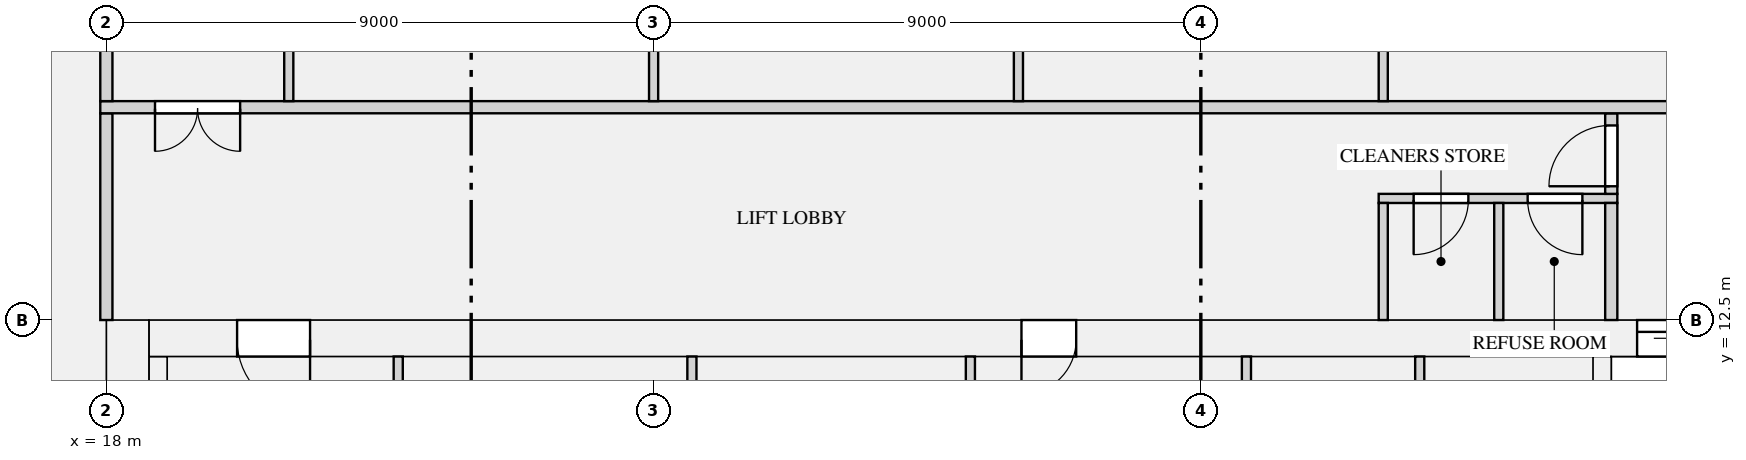
"""IFC4 building model, lengths in metres.
Left out: names, types, materials, properties, quantities, classifications, styles, units other than length and angle.
Written with IfcOpenShell. Run it as: python <this file> out.ifc"""

import sys

from ifc_helpers import new_model, si_unit, direction, frame, frame_2d, origin, place, context, subcontext, project, spatial, rectangle, extrude, element, fill, save


model = new_model("IFC4")
c1 = context("Model", 3, precision=1e-05, world=origin(), true_north=direction((0.0, 1.0)))
c2 = subcontext(c1, "Body", "Model", "MODEL_VIEW")
j1 = project(units=[si_unit("LENGTHUNIT", "METRE"), si_unit("PLANEANGLEUNIT", "RADIAN")], contexts=[c1])
p1 = place(None, origin())
s1 = spatial("IfcSite", under=j1, at=p1, CompositionType="ELEMENT")
p2 = place(p1, origin())
s2 = spatial("IfcBuilding", under=s1, at=p2, CompositionType="ELEMENT")
p3 = place(p2, frame((0.0, 0.0, 144.45)))
s3 = spatial("IfcBuildingStorey", under=s2, at=p3, CompositionType="ELEMENT", Elevation=144.45)
p4 = place(p3, frame((18.35, 0.0, 0.0), z_axis=(0.0, 0.0, 1.0), x_axis=(0.0, 1.0, 0.0)))
e1 = element("IfcWall", 1, at=p4, inside=s3, PredefinedType="SHEAR", context=c2, shape_type="SweptSolid", body=[
    extrude(rectangle(XDim=12.5, YDim=0.7, at=frame_2d((6.25, 0.0))), origin(), (0.0, 0.0, 1.0), 3.15),
])
p5 = place(p3, frame((18.7, 12.2, 0.0), z_axis=(0.0, 0.0, 1.0), x_axis=(1.0, 0.0, 0.0)))
e2 = element("IfcWall", 2, at=p5, inside=s3, PredefinedType="SHEAR", context=c2, shape_type="SweptSolid", body=[
    extrude(rectangle(XDim=34.6, YDim=0.6, at=frame_2d((17.3, 0.0))), origin(), (0.0, 0.0, 1.0), 3.15),
])
p6 = place(p5, frame((24.475, 0.0, 0.0)))
e3 = element("IfcOpeningElement", 3, at=p6, cuts=e2, PredefinedType="OPENING", context=c2, shape_type="SweptSolid", body=[
    extrude(rectangle(XDim=1.1, YDim=2.1, at=frame_2d((0.55, 1.05))), frame((0.0, 0.31, 0.0), z_axis=(0.0, -1.0, 0.0), x_axis=(1.0, 0.0, 0.0)), (0.0, 0.0, 1.0), 0.62),
])
p7 = place(p5, frame((26.725, 0.0, 0.0)))
e4 = element("IfcOpeningElement", 4, at=p7, cuts=e2, PredefinedType="OPENING", context=c2, shape_type="SweptSolid", body=[
    extrude(rectangle(XDim=1.1, YDim=2.1, at=frame_2d((0.55, 1.05))), frame((0.0, 0.31, 0.0), z_axis=(0.0, -1.0, 0.0), x_axis=(1.0, 0.0, 0.0)), (0.0, 0.0, 1.0), 0.62),
])
p8 = place(p5, frame((28.975, 0.0, 0.0)))
e5 = element("IfcOpeningElement", 5, at=p8, cuts=e2, PredefinedType="OPENING", context=c2, shape_type="SweptSolid", body=[
    extrude(rectangle(XDim=1.1, YDim=2.1, at=frame_2d((0.55, 1.05))), frame((0.0, 0.31, 0.0), z_axis=(0.0, -1.0, 0.0), x_axis=(1.0, 0.0, 0.0)), (0.0, 0.0, 1.0), 0.62),
])
p9 = place(p5, frame((14.35, 0.0, 0.0)))
e6 = element("IfcOpeningElement", 6, at=p9, cuts=e2, PredefinedType="OPENING", context=c2, shape_type="SweptSolid", body=[
    extrude(rectangle(XDim=0.9, YDim=2.1, at=frame_2d((0.45, 1.05))), frame((0.0, 0.31, 0.0), z_axis=(0.0, -1.0, 0.0), x_axis=(1.0, 0.0, 0.0)), (0.0, 0.0, 1.0), 0.62),
])
p10 = place(p5, frame((1.45, 0.0, 0.0)))
e7 = element("IfcOpeningElement", 7, at=p10, cuts=e2, PredefinedType="OPENING", context=c2, shape_type="SweptSolid", body=[
    extrude(rectangle(XDim=1.2, YDim=2.1, at=frame_2d((0.6, 1.05))), frame((0.0, 0.31, 0.0), z_axis=(0.0, -1.0, 0.0), x_axis=(1.0, 0.0, 0.0)), (0.0, 0.0, 1.0), 0.62),
])
p11 = place(p5, frame((31.95, 0.0, 0.0)))
e8 = element("IfcOpeningElement", 8, at=p11, cuts=e2, PredefinedType="OPENING", context=c2, shape_type="SweptSolid", body=[
    extrude(rectangle(XDim=1.2, YDim=2.1, at=frame_2d((0.6, 1.05))), frame((0.0, 0.31, 0.0), z_axis=(0.0, -1.0, 0.0), x_axis=(1.0, 0.0, 0.0)), (0.0, 0.0, 1.0), 0.62),
])
p12 = place(p3, frame((18.85, 1.0, 0.0), z_axis=(0.0, 0.0, 1.0), x_axis=(0.0, 1.0, 0.0)))
e9 = element("IfcWall", 9, at=p12, inside=s3, PredefinedType="SHEAR", context=c2, shape_type="SweptSolid", body=[
    extrude(rectangle(XDim=10.9, YDim=0.3, at=frame_2d((5.45, 0.0))), origin(), (0.0, 0.0, 1.0), 3.15),
])
p13 = place(p3, frame((42.6, 8.25, 0.0), z_axis=(0.0, 0.0, 1.0), x_axis=(0.0, 1.0, 0.0)))
e10 = element("IfcWall", 10, at=p13, inside=s3, PredefinedType="SHEAR", context=c2, shape_type="SweptSolid", body=[
    extrude(rectangle(XDim=3.65, YDim=0.3, at=frame_2d((1.825, 0.0))), origin(), (0.0, 0.0, 1.0), 3.15),
])
p14 = place(p3, frame((38.925, 14.5, 0.0), z_axis=(0.0, 0.0, 1.0), x_axis=(1.0, 0.0, 0.0)))
e11 = element("IfcWall", 11, at=p14, inside=s3, PredefinedType="PARTITIONING", context=c2, shape_type="SweptSolid", body=[
    extrude(rectangle(XDim=3.925, YDim=0.15, at=frame_2d((1.962, 0.0))), origin(), (0.0, 0.0, 1.0), 2.83),
])
p15 = place(p14, frame((0.575, 0.0, 0.0)))
e12 = element("IfcOpeningElement", 12, at=p15, cuts=e11, PredefinedType="OPENING", context=c2, shape_type="SweptSolid", body=[
    extrude(rectangle(XDim=0.9, YDim=2.1, at=frame_2d((0.45, 1.05))), frame((0.0, 0.085, 0.0), z_axis=(0.0, -1.0, 0.0), x_axis=(1.0, 0.0, 0.0)), (0.0, 0.0, 1.0), 0.17),
])
p16 = place(p14, frame((2.45, 0.0, 0.0)))
e13 = element("IfcOpeningElement", 13, at=p16, cuts=e11, PredefinedType="OPENING", context=c2, shape_type="SweptSolid", body=[
    extrude(rectangle(XDim=0.9, YDim=2.1, at=frame_2d((0.45, 1.05))), frame((0.0, 0.085, 0.0), z_axis=(0.0, -1.0, 0.0), x_axis=(1.0, 0.0, 0.0)), (0.0, 0.0, 1.0), 0.17),
])
for number, where, z_axis, x_axis in (
    (14, (22.8, 6.725, 0.0), (0.0, 0.0, 1.0), (0.0, 1.0, 0.0)),
    (15, (27.63, 6.725, 0.0), (0.0, 0.0, 1.0), (0.0, 1.0, 0.0)),
    (16, (39.6, 6.725, 0.0), (0.0, 0.0, 1.0), (0.0, 1.0, 0.0)),
):
    element("IfcWall", number, at=place(p3, frame(where, z_axis=z_axis, x_axis=x_axis)), inside=s3, PredefinedType="PARTITIONING", context=c2, shape_type="SweptSolid", body=[
        extrude(rectangle(XDim=5.175, YDim=0.15, at=frame_2d((2.587, 0.0))), origin(), (0.0, 0.0, 1.0), 2.83),
    ])
for number, where, z_axis, x_axis in (
    (17, (32.21, 9.345, 0.0), (0.0, 0.0, 1.0), (0.0, 1.0, 0.0)),
    (18, (36.75, 9.345, 0.0), (0.0, 0.0, 1.0), (0.0, 1.0, 0.0)),
):
    element("IfcWall", number, at=place(p3, frame(where, z_axis=z_axis, x_axis=x_axis)), inside=s3, PredefinedType="PARTITIONING", context=c2, shape_type="SweptSolid", body=[
        extrude(rectangle(XDim=2.555, YDim=0.15, at=frame_2d((1.277, 0.0))), origin(), (0.0, 0.0, 1.0), 2.83),
    ])
p17 = place(p3, frame((18.0, 12.5, 0.0), z_axis=(0.0, 0.0, 1.0), x_axis=(0.0, 1.0, 0.0)))
e19 = element("IfcWall", 19, at=p17, inside=s3, PredefinedType="PARTITIONING", context=c2, shape_type="SweptSolid", body=[
    extrude(rectangle(XDim=3.4, YDim=0.2, at=frame_2d((1.7, 0.0))), origin(), (0.0, 0.0, 1.0), 2.83),
])
for number, where, z_axis, x_axis in (
    (20, (39.0, 12.5, 0.0), (0.0, 0.0, 1.0), (0.0, 1.0, 0.0)),
    (21, (40.9, 12.5, 0.0), (0.0, 0.0, 1.0), (0.0, 1.0, 0.0)),
):
    element("IfcWall", number, at=place(p3, frame(where, z_axis=z_axis, x_axis=x_axis)), inside=s3, PredefinedType="PARTITIONING", context=c2, shape_type="SweptSolid", body=[
        extrude(rectangle(XDim=1.925, YDim=0.15, at=frame_2d((0.962, 0.0))), origin(), (0.0, 0.0, 1.0), 2.83),
    ])
p18 = place(p3, frame((42.75, 12.5, 0.0), z_axis=(0.0, 0.0, 1.0), x_axis=(0.0, 1.0, 0.0)))
e22 = element("IfcWall", 22, at=p18, inside=s3, PredefinedType="PARTITIONING", context=c2, shape_type="SweptSolid", body=[
    extrude(rectangle(XDim=1.925, YDim=0.2, at=frame_2d((0.962, 0.0))), origin(), (0.0, 0.0, 1.0), 2.83),
])
p19 = place(p3, frame((42.75, 14.575, 0.0), z_axis=(0.0, 0.0, 1.0), x_axis=(0.0, 1.0, 0.0)))
e23 = element("IfcWall", 23, at=p19, inside=s3, PredefinedType="PARTITIONING", context=c2, shape_type="SweptSolid", body=[
    extrude(rectangle(XDim=1.325, YDim=0.2, at=frame_2d((0.663, 0.0))), origin(), (0.0, 0.0, 1.0), 2.83),
])
p20 = place(p19, frame((0.125, 0.0, 0.0)))
e24 = element("IfcOpeningElement", 24, at=p20, cuts=e23, PredefinedType="OPENING", context=c2, shape_type="SweptSolid", body=[
    extrude(rectangle(XDim=1.0, YDim=2.1, at=frame_2d((0.5, 1.05))), frame((0.0, 0.11, 0.0), z_axis=(0.0, -1.0, 0.0), x_axis=(1.0, 0.0, 0.0)), (0.0, 0.0, 1.0), 0.22),
])
p21 = place(p3, frame((17.9, 16.0, 0.0), z_axis=(0.0, 0.0, 1.0), x_axis=(1.0, 0.0, 0.0)))
e25 = element("IfcWall", 25, at=p21, inside=s3, PredefinedType="PARTITIONING", context=c2, shape_type="SweptSolid", body=[
    extrude(rectangle(XDim=36.2, YDim=0.2, at=frame_2d((18.1, 0.0))), origin(), (0.0, 0.0, 1.0), 2.83),
])
p22 = place(p21, frame((0.9, 0.0, 0.0)))
e26 = element("IfcOpeningElement", 26, at=p22, cuts=e25, PredefinedType="OPENING", context=c2, shape_type="SweptSolid", body=[
    extrude(rectangle(XDim=1.4, YDim=2.1, at=frame_2d((0.7, 1.05))), frame((0.0, 0.11, 0.0), z_axis=(0.0, -1.0, 0.0), x_axis=(1.0, 0.0, 0.0)), (0.0, 0.0, 1.0), 0.22),
])
p23 = place(p21, frame((33.9, 0.0, 0.0)))
e27 = element("IfcOpeningElement", 27, at=p23, cuts=e25, PredefinedType="OPENING", context=c2, shape_type="SweptSolid", body=[
    extrude(rectangle(XDim=1.4, YDim=2.1, at=frame_2d((0.7, 1.05))), frame((0.0, 0.11, 0.0), z_axis=(0.0, -1.0, 0.0), x_axis=(1.0, 0.0, 0.0)), (0.0, 0.0, 1.0), 0.22),
])
p24 = place(p3, frame((18.0, 16.1, 0.0), z_axis=(0.0, 0.0, 1.0), x_axis=(0.0, 1.0, 0.0)))
e28 = element("IfcWall", 28, at=p24, inside=s3, PredefinedType="PARTITIONING", context=c2, shape_type="SweptSolid", body=[
    extrude(rectangle(XDim=7.8, YDim=0.2, at=frame_2d((3.9, 0.0))), origin(), (0.0, 0.0, 1.0), 2.83),
])
p25 = place(p24, frame((1.85, 0.0, 0.0)))
e29 = element("IfcOpeningElement", 29, at=p25, cuts=e28, PredefinedType="OPENING", context=c2, shape_type="SweptSolid", body=[
    extrude(rectangle(XDim=1.1, YDim=2.1, at=frame_2d((0.55, 1.05))), frame((0.0, 0.11, 0.0), z_axis=(0.0, -1.0, 0.0), x_axis=(1.0, 0.0, 0.0)), (0.0, 0.0, 1.0), 0.22),
])
for number, where, z_axis, x_axis in (
    (30, (21.0, 16.1, 0.0), (0.0, 0.0, 1.0), (0.0, 1.0, 0.0)),
    (31, (27.0, 16.1, 0.0), (0.0, 0.0, 1.0), (0.0, 1.0, 0.0)),
    (32, (33.0, 16.1, 0.0), (0.0, 0.0, 1.0), (0.0, 1.0, 0.0)),
    (33, (39.0, 16.1, 0.0), (0.0, 0.0, 1.0), (0.0, 1.0, 0.0)),
):
    element("IfcWall", number, at=place(p3, frame(where, z_axis=z_axis, x_axis=x_axis)), inside=s3, PredefinedType="PARTITIONING", context=c2, shape_type="SweptSolid", body=[
        extrude(rectangle(XDim=4.825, YDim=0.15, at=frame_2d((2.413, 0.0))), origin(), (0.0, 0.0, 1.0), 2.83),
    ])
p26 = place(p6, origin())
e34 = element("IfcDoor", 34, at=p26, inside=s3, OperationType="DOUBLE_DOOR_SLIDING", PredefinedType="DOOR", context=c2, shape_type="SweptSolid", body=[
    extrude(rectangle(XDim=1.1, YDim=2.1, at=frame_2d((0.55, 1.05))), frame((0.0, 0.025, 0.0), z_axis=(0.0, -1.0, 0.0), x_axis=(1.0, 0.0, 0.0)), (0.0, 0.0, 1.0), 0.05),
])
fill(e3, e34)
p27 = place(p15, frame((0.9, 0.0, 0.0), z_axis=(0.0, 0.0, 1.0), x_axis=(-1.0, 0.0, 0.0)))
e35 = element("IfcDoor", 35, at=p27, inside=s3, OperationType="SINGLE_SWING_RIGHT", PredefinedType="DOOR", context=c2, shape_type="SweptSolid", body=[
    extrude(rectangle(XDim=0.9, YDim=2.1, at=frame_2d((0.45, 1.05))), frame((0.0, 0.025, 0.0), z_axis=(0.0, -1.0, 0.0), x_axis=(1.0, 0.0, 0.0)), (0.0, 0.0, 1.0), 0.05),
])
fill(e12, e35)
p28 = place(p16, frame((0.9, 0.0, 0.0), z_axis=(0.0, 0.0, 1.0), x_axis=(-1.0, 0.0, 0.0)))
e36 = element("IfcDoor", 36, at=p28, inside=s3, OperationType="SINGLE_SWING_LEFT", PredefinedType="DOOR", context=c2, shape_type="SweptSolid", body=[
    extrude(rectangle(XDim=0.9, YDim=2.1, at=frame_2d((0.45, 1.05))), frame((0.0, 0.025, 0.0), z_axis=(0.0, -1.0, 0.0), x_axis=(1.0, 0.0, 0.0)), (0.0, 0.0, 1.0), 0.05),
])
fill(e13, e36)
p29 = place(p9, frame((0.9, 0.0, 0.0), z_axis=(0.0, 0.0, 1.0), x_axis=(-1.0, 0.0, 0.0)))
e37 = element("IfcDoor", 37, at=p29, inside=s3, OperationType="SINGLE_SWING_RIGHT", PredefinedType="DOOR", context=c2, shape_type="SweptSolid", body=[
    extrude(rectangle(XDim=0.9, YDim=2.1, at=frame_2d((0.45, 1.05))), frame((0.0, 0.025, 0.0), z_axis=(0.0, -1.0, 0.0), x_axis=(1.0, 0.0, 0.0)), (0.0, 0.0, 1.0), 0.05),
])
fill(e6, e37)
p30 = place(p10, frame((1.2, 0.0, 0.0), z_axis=(0.0, 0.0, 1.0), x_axis=(-1.0, 0.0, 0.0)))
e38 = element("IfcDoor", 38, at=p30, inside=s3, OperationType="SINGLE_SWING_LEFT", PredefinedType="DOOR", context=c2, shape_type="SweptSolid", body=[
    extrude(rectangle(XDim=1.2, YDim=2.1, at=frame_2d((0.6, 1.05))), frame((0.0, 0.025, 0.0), z_axis=(0.0, -1.0, 0.0), x_axis=(1.0, 0.0, 0.0)), (0.0, 0.0, 1.0), 0.05),
])
fill(e7, e38)
p31 = place(p20, origin())
e39 = element("IfcDoor", 39, at=p31, inside=s3, OperationType="SINGLE_SWING_LEFT", PredefinedType="DOOR", context=c2, shape_type="SweptSolid", body=[
    extrude(rectangle(XDim=1.0, YDim=2.1, at=frame_2d((0.5, 1.05))), frame((0.0, 0.025, 0.0), z_axis=(0.0, -1.0, 0.0), x_axis=(1.0, 0.0, 0.0)), (0.0, 0.0, 1.0), 0.05),
])
fill(e24, e39)
p32 = place(p22, frame((1.4, 0.0, 0.0), z_axis=(0.0, 0.0, 1.0), x_axis=(-1.0, 0.0, 0.0)))
e40 = element("IfcDoor", 40, at=p32, inside=s3, OperationType="DOUBLE_DOOR_SINGLE_SWING", PredefinedType="DOOR", context=c2, shape_type="SweptSolid", body=[
    extrude(rectangle(XDim=1.4, YDim=2.1, at=frame_2d((0.7, 1.05))), frame((0.0, 0.025, 0.0), z_axis=(0.0, -1.0, 0.0), x_axis=(1.0, 0.0, 0.0)), (0.0, 0.0, 1.0), 0.05),
])
fill(e26, e40)
save(model, sys.argv[1])
